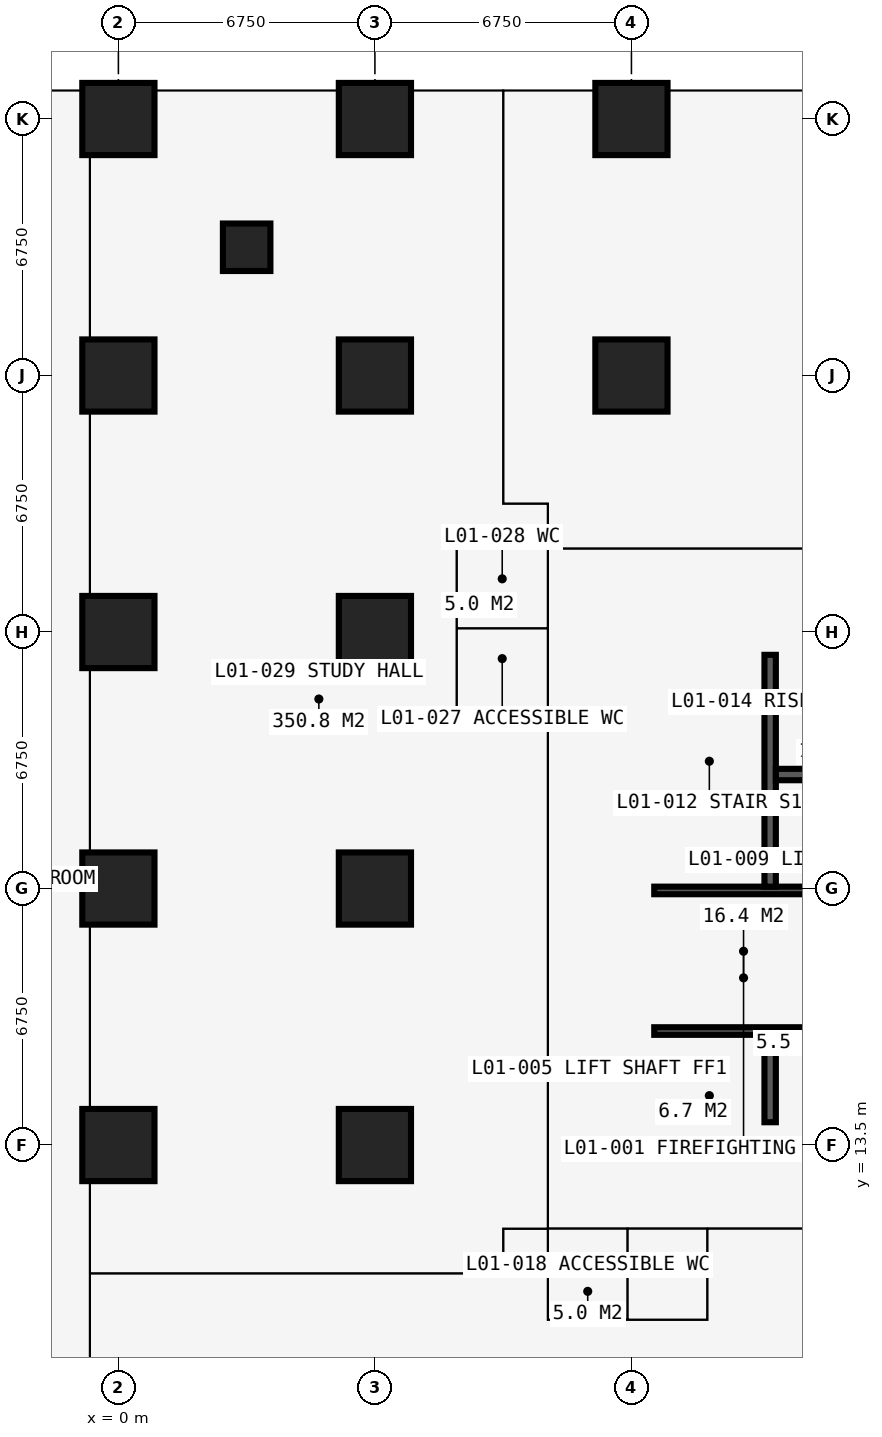
"""IFC4 building model, lengths in metres.
Left out: names, types, materials, properties, quantities, classifications, styles, units other than length and angle.
Written with IfcOpenShell. Run it as: python <this file> out.ifc"""

import sys

from ifc_helpers import new_model, si_unit, direction, frame, frame_2d, origin, origin_2d, place, context, subcontext, project, spatial, rectangle, extrude, element, fill, save


model = new_model("IFC4")
c1 = context("Model", 3, precision=1e-05, world=origin(), true_north=direction((0.0, 1.0)))
c2 = subcontext(c1, "Body", "Model", "MODEL_VIEW")
j1 = project(units=[si_unit("LENGTHUNIT", "METRE"), si_unit("PLANEANGLEUNIT", "RADIAN")], contexts=[c1])
p1 = place(None, origin())
s1 = spatial("IfcSite", under=j1, at=p1, CompositionType="ELEMENT")
p2 = place(p1, origin())
s2 = spatial("IfcBuilding", under=s1, at=p2, CompositionType="ELEMENT")
p3 = place(p2, frame((0.0, 0.0, 4.5)))
s3 = spatial("IfcBuildingStorey", under=s2, at=p3, CompositionType="ELEMENT", Elevation=4.5)
for number, where, z_axis, x_axis in (
    (1, (0.0, 13.5, 0.0), (0.0, 0.0, 1.0), (1.0, 0.0, 0.0)),
    (2, (0.0, 20.25, 0.0), (0.0, 0.0, 1.0), (1.0, 0.0, 0.0)),
    (3, (0.0, 27.0, 0.0), (0.0, 0.0, 1.0), (1.0, 0.0, 0.0)),
    (4, (0.0, 33.75, 0.0), (0.0, 0.0, 1.0), (1.0, 0.0, 0.0)),
    (5, (0.0, 40.5, 0.0), (0.0, 0.0, 1.0), (1.0, 0.0, 0.0)),
):
    element("IfcColumn", number, at=place(p3, frame(where, z_axis=z_axis, x_axis=x_axis)), inside=s3, PredefinedType="COLUMN", context=c2, shape_type="SweptSolid", body=[
        extrude(rectangle(XDim=1.9, YDim=1.9, at=origin_2d()), origin(), (0.0, 0.0, 1.0), 4.5),
    ])
p4 = place(p3, frame((3.375, 37.125, 0.0), z_axis=(0.0, 0.0, 1.0), x_axis=(1.0, 0.0, 0.0)))
e6 = element("IfcColumn", 6, at=p4, inside=s3, PredefinedType="COLUMN", context=c2, shape_type="SweptSolid", body=[
    extrude(rectangle(XDim=1.25, YDim=1.25, at=origin_2d()), origin(), (0.0, 0.0, 1.0), 4.5),
])
for number, where, z_axis, x_axis in (
    (7, (6.75, 13.5, 0.0), (0.0, 0.0, 1.0), (1.0, 0.0, 0.0)),
    (8, (6.75, 20.25, 0.0), (0.0, 0.0, 1.0), (1.0, 0.0, 0.0)),
    (9, (6.75, 27.0, 0.0), (0.0, 0.0, 1.0), (1.0, 0.0, 0.0)),
    (10, (6.75, 33.75, 0.0), (0.0, 0.0, 1.0), (1.0, 0.0, 0.0)),
    (11, (6.75, 40.5, 0.0), (0.0, 0.0, 1.0), (1.0, 0.0, 0.0)),
    (12, (13.5, 33.75, 0.0), (0.0, 0.0, 1.0), (1.0, 0.0, 0.0)),
    (13, (13.5, 40.5, 0.0), (0.0, 0.0, 1.0), (1.0, 0.0, 0.0)),
):
    element("IfcColumn", number, at=place(p3, frame(where, z_axis=z_axis, x_axis=x_axis)), inside=s3, PredefinedType="COLUMN", context=c2, shape_type="SweptSolid", body=[
        extrude(rectangle(XDim=1.9, YDim=1.9, at=origin_2d()), origin(), (0.0, 0.0, 1.0), 4.5),
    ])
p5 = place(p3, frame((12.9, 13.5, 0.0), z_axis=(0.0, 0.0, 1.0), x_axis=(1.0, 0.0, 0.0)))
e14 = element("IfcWall", 14, at=p5, inside=s3, PredefinedType="SHEAR", context=c2, shape_type="SweptSolid", body=[
    extrude(rectangle(XDim=14.7, YDim=1.2, at=frame_2d((7.35, 0.0))), origin(), (0.0, 0.0, 1.0), 4.5),
])
p6 = place(p3, frame((27.6, 27.0, 0.0), z_axis=(0.0, 0.0, 1.0), x_axis=(-1.0, 0.0, 0.0)))
e15 = element("IfcWall", 15, at=p6, inside=s3, PredefinedType="SHEAR", context=c2, shape_type="SweptSolid", body=[
    extrude(rectangle(XDim=14.7, YDim=1.2, at=frame_2d((7.35, 0.0))), origin(), (0.0, 0.0, 1.0), 4.5),
])
p7 = place(p6, frame((4.55, 0.0, 0.0)))
e16 = element("IfcOpeningElement", 16, at=p7, cuts=e15, PredefinedType="OPENING", context=c2, shape_type="SweptSolid", body=[
    extrude(rectangle(XDim=0.9, YDim=2.2, at=frame_2d((0.45, 1.1))), frame((0.0, 0.61, 0.0), z_axis=(0.0, -1.0, 0.0), x_axis=(1.0, 0.0, 0.0)), (0.0, 0.0, 1.0), 1.22),
])
p8 = place(p6, frame((7.525, 0.0, 0.0)))
e17 = element("IfcOpeningElement", 17, at=p8, cuts=e15, PredefinedType="OPENING", context=c2, shape_type="SweptSolid", body=[
    extrude(rectangle(XDim=1.0, YDim=2.2, at=frame_2d((0.5, 1.1))), frame((0.0, 0.61, 0.0), z_axis=(0.0, -1.0, 0.0), x_axis=(1.0, 0.0, 0.0)), (0.0, 0.0, 1.0), 1.22),
])
p9 = place(p3, frame((13.5, 26.4, 0.0), z_axis=(0.0, 0.0, 1.0), x_axis=(0.0, -1.0, 0.0)))
e18 = element("IfcWall", 18, at=p9, inside=s3, PredefinedType="SHEAR", context=c2, shape_type="SweptSolid", body=[
    extrude(rectangle(XDim=12.3, YDim=1.2, at=frame_2d((6.15, 0.0))), origin(), (0.0, 0.0, 1.0), 4.5),
])
p10 = place(p9, frame((7.45, 0.0, 0.0)))
e19 = element("IfcOpeningElement", 19, at=p10, cuts=e18, PredefinedType="OPENING", context=c2, shape_type="SweptSolid", body=[
    extrude(rectangle(XDim=1.2, YDim=2.2, at=frame_2d((0.6, 1.1))), frame((0.0, 0.61, 0.0), z_axis=(0.0, -1.0, 0.0), x_axis=(1.0, 0.0, 0.0)), (0.0, 0.0, 1.0), 1.22),
])
p11 = place(p3, frame((14.1, 16.5, 0.0), z_axis=(0.0, 0.0, 1.0), x_axis=(1.0, 0.0, 0.0)))
e20 = element("IfcWall", 20, at=p11, inside=s3, PredefinedType="SHEAR", context=c2, shape_type="SweptSolid", body=[
    extrude(rectangle(XDim=12.3, YDim=0.2, at=frame_2d((6.15, 0.0))), origin(), (0.0, 0.0, 1.0), 4.5),
])
p12 = place(p11, frame((0.9, 0.0, 0.0)))
e21 = element("IfcOpeningElement", 21, at=p12, cuts=e20, PredefinedType="OPENING", context=c2, shape_type="SweptSolid", body=[
    extrude(rectangle(XDim=1.1, YDim=2.2, at=frame_2d((0.55, 1.1))), frame((0.0, 0.11, 0.0), z_axis=(0.0, -1.0, 0.0), x_axis=(1.0, 0.0, 0.0)), (0.0, 0.0, 1.0), 0.22),
])
p13 = place(p11, frame((9.5, 0.0, 0.0)))
e22 = element("IfcOpeningElement", 22, at=p13, cuts=e20, PredefinedType="OPENING", context=c2, shape_type="SweptSolid", body=[
    extrude(rectangle(XDim=1.1, YDim=2.2, at=frame_2d((0.55, 1.1))), frame((0.0, 0.11, 0.0), z_axis=(0.0, -1.0, 0.0), x_axis=(1.0, 0.0, 0.0)), (0.0, 0.0, 1.0), 0.22),
])
p14 = place(p3, frame((14.1, 20.2, 0.0), z_axis=(0.0, 0.0, 1.0), x_axis=(1.0, 0.0, 0.0)))
e23 = element("IfcWall", 23, at=p14, inside=s3, PredefinedType="SHEAR", context=c2, shape_type="SweptSolid", body=[
    extrude(rectangle(XDim=12.3, YDim=0.2, at=frame_2d((6.15, 0.0))), origin(), (0.0, 0.0, 1.0), 4.5),
])
p15 = place(p14, frame((0.35, 0.0, 0.0)))
e24 = element("IfcOpeningElement", 24, at=p15, cuts=e23, PredefinedType="OPENING", context=c2, shape_type="SweptSolid", body=[
    extrude(rectangle(XDim=1.1, YDim=2.2, at=frame_2d((0.55, 1.1))), frame((0.0, 0.11, 0.0), z_axis=(0.0, -1.0, 0.0), x_axis=(1.0, 0.0, 0.0)), (0.0, 0.0, 1.0), 0.22),
])
p16 = place(p14, frame((9.75, 0.0, 0.0)))
e25 = element("IfcOpeningElement", 25, at=p16, cuts=e23, PredefinedType="OPENING", context=c2, shape_type="SweptSolid", body=[
    extrude(rectangle(XDim=1.1, YDim=2.2, at=frame_2d((0.55, 1.1))), frame((0.0, 0.11, 0.0), z_axis=(0.0, -1.0, 0.0), x_axis=(1.0, 0.0, 0.0)), (0.0, 0.0, 1.0), 0.22),
])
p17 = place(p3, frame((17.15, 20.3, 0.0), z_axis=(0.0, 0.0, 1.0), x_axis=(0.0, 1.0, 0.0)))
e26 = element("IfcWall", 26, at=p17, inside=s3, PredefinedType="SHEAR", context=c2, shape_type="SweptSolid", body=[
    extrude(rectangle(XDim=6.1, YDim=0.3, at=frame_2d((3.05, 0.0))), origin(), (0.0, 0.0, 1.0), 4.5),
])
p18 = place(p3, frame((17.3, 23.25, 0.0), z_axis=(0.0, 0.0, 1.0), x_axis=(1.0, 0.0, 0.0)))
e27 = element("IfcWall", 27, at=p18, inside=s3, PredefinedType="SHEAR", context=c2, shape_type="SweptSolid", body=[
    extrude(rectangle(XDim=5.9, YDim=0.3, at=frame_2d((2.95, 0.0))), origin(), (0.0, 0.0, 1.0), 4.5),
])
p19 = place(p3, frame((17.15, 14.1, 0.0), z_axis=(0.0, 0.0, 1.0), x_axis=(0.0, 1.0, 0.0)))
e28 = element("IfcWall", 28, at=p19, inside=s3, PredefinedType="SHEAR", context=c2, shape_type="SweptSolid", body=[
    extrude(rectangle(XDim=2.3, YDim=0.3, at=frame_2d((1.15, 0.0))), origin(), (0.0, 0.0, 1.0), 4.5),
])
p20 = place(p3, frame((-0.75, -0.75, 0.0), z_axis=(0.0, 0.0, 1.0), x_axis=(0.0, 1.0, 0.0)))
e29 = element("IfcWall", 29, at=p20, inside=s3, PredefinedType="PARTITIONING", context=c2, shape_type="SweptSolid", body=[
    extrude(rectangle(XDim=41.984, YDim=0.15, at=frame_2d((20.992, 0.0))), origin(), (0.0, 0.0, 1.0), 4.25),
])
p21 = place(p20, frame((4.65, 0.0, 0.0)))
e30 = element("IfcOpeningElement", 30, at=p21, cuts=e29, PredefinedType="OPENING", context=c2, shape_type="SweptSolid", body=[
    extrude(rectangle(XDim=1.6, YDim=2.4, at=frame_2d((0.8, 1.2))), frame((0.0, 0.085, 0.0), z_axis=(0.0, -1.0, 0.0), x_axis=(1.0, 0.0, 0.0)), (0.0, 0.0, 1.0), 0.17),
])
p22 = place(p3, frame((-0.75, 10.125, 0.0), z_axis=(0.0, 0.0, 1.0), x_axis=(1.0, 0.0, 0.0)))
e31 = element("IfcWall", 31, at=p22, inside=s3, PredefinedType="PARTITIONING", context=c2, shape_type="SweptSolid", body=[
    extrude(rectangle(XDim=10.875, YDim=0.15, at=frame_2d((5.438, 0.0))), origin(), (0.0, 0.0, 1.0), 4.25),
])
p23 = place(p3, frame((8.9, 25.0, 0.0), z_axis=(0.0, 0.0, 1.0), x_axis=(0.0, 1.0, 0.0)))
e32 = element("IfcWall", 32, at=p23, inside=s3, PredefinedType="PARTITIONING", context=c2, shape_type="SweptSolid", body=[
    extrude(rectangle(XDim=4.2, YDim=0.15, at=frame_2d((2.1, 0.0))), origin(), (0.0, 0.0, 1.0), 4.25),
])
p24 = place(p3, frame((8.9, 25.0, 0.0), z_axis=(0.0, 0.0, 1.0), x_axis=(1.0, 0.0, 0.0)))
e33 = element("IfcWall", 33, at=p24, inside=s3, PredefinedType="PARTITIONING", context=c2, shape_type="SweptSolid", body=[
    extrude(rectangle(XDim=2.4, YDim=0.1, at=frame_2d((1.2, 0.0))), origin(), (0.0, 0.0, 1.0), 4.25),
])
p25 = place(p3, frame((8.9, 27.1, 0.0), z_axis=(0.0, 0.0, 1.0), x_axis=(1.0, 0.0, 0.0)))
e34 = element("IfcWall", 34, at=p25, inside=s3, PredefinedType="PARTITIONING", context=c2, shape_type="SweptSolid", body=[
    extrude(rectangle(XDim=2.4, YDim=0.1, at=frame_2d((1.2, 0.0))), origin(), (0.0, 0.0, 1.0), 3.752),
])
p26 = place(p3, frame((8.9, 29.2, 0.0), z_axis=(0.0, 0.0, 1.0), x_axis=(1.0, 0.0, 0.0)))
e35 = element("IfcWall", 35, at=p26, inside=s3, PredefinedType="PARTITIONING", context=c2, shape_type="SweptSolid", body=[
    extrude(rectangle(XDim=21.475, YDim=0.15, at=frame_2d((10.738, 0.0))), origin(), (0.0, 0.0, 1.0), 4.25),
])
p27 = place(p26, frame((16.65, 0.0, 0.0)))
e36 = element("IfcOpeningElement", 36, at=p27, cuts=e35, PredefinedType="OPENING", context=c2, shape_type="SweptSolid", body=[
    extrude(rectangle(XDim=1.0, YDim=2.2, at=frame_2d((0.5, 1.1))), frame((0.0, 0.085, 0.0), z_axis=(0.0, -1.0, 0.0), x_axis=(1.0, 0.0, 0.0)), (0.0, 0.0, 1.0), 0.17),
])
p28 = place(p26, frame((18.75, 0.0, 0.0)))
e37 = element("IfcOpeningElement", 37, at=p28, cuts=e35, PredefinedType="OPENING", context=c2, shape_type="SweptSolid", body=[
    extrude(rectangle(XDim=1.0, YDim=2.2, at=frame_2d((0.5, 1.1))), frame((0.0, 0.085, 0.0), z_axis=(0.0, -1.0, 0.0), x_axis=(1.0, 0.0, 0.0)), (0.0, 0.0, 1.0), 0.17),
])
p29 = place(p26, frame((8.45, 0.0, 0.0)))
e38 = element("IfcOpeningElement", 38, at=p29, cuts=e35, PredefinedType="OPENING", context=c2, shape_type="SweptSolid", body=[
    extrude(rectangle(XDim=1.6, YDim=2.4, at=frame_2d((0.8, 1.2))), frame((0.0, 0.085, 0.0), z_axis=(0.0, -1.0, 0.0), x_axis=(1.0, 0.0, 0.0)), (0.0, 0.0, 1.0), 0.17),
])
p30 = place(p3, frame((10.125, 10.125, 0.0), z_axis=(0.0, 0.0, 1.0), x_axis=(0.0, 1.0, 0.0)))
e39 = element("IfcWall", 39, at=p30, inside=s3, PredefinedType="PARTITIONING", context=c2, shape_type="SweptSolid", body=[
    extrude(rectangle(XDim=1.175, YDim=0.15, at=frame_2d((0.587, 0.0))), origin(), (0.0, 0.0, 1.0), 4.25),
])
p31 = place(p3, frame((10.125, 11.3, 0.0), z_axis=(0.0, 0.0, 1.0), x_axis=(1.0, 0.0, 0.0)))
e40 = element("IfcWall", 40, at=p31, inside=s3, PredefinedType="PARTITIONING", context=c2, shape_type="SweptSolid", body=[
    extrude(rectangle(XDim=20.675, YDim=0.15, at=frame_2d((10.337, 0.0))), origin(), (0.0, 0.0, 1.0), 4.25),
])
p32 = place(p31, frame((1.725, 0.0, 0.0)))
e41 = element("IfcOpeningElement", 41, at=p32, cuts=e40, PredefinedType="OPENING", context=c2, shape_type="SweptSolid", body=[
    extrude(rectangle(XDim=1.0, YDim=2.2, at=frame_2d((0.5, 1.1))), frame((0.0, 0.085, 0.0), z_axis=(0.0, -1.0, 0.0), x_axis=(1.0, 0.0, 0.0)), (0.0, 0.0, 1.0), 0.17),
])
p33 = place(p31, frame((3.825, 0.0, 0.0)))
e42 = element("IfcOpeningElement", 42, at=p33, cuts=e40, PredefinedType="OPENING", context=c2, shape_type="SweptSolid", body=[
    extrude(rectangle(XDim=1.0, YDim=2.2, at=frame_2d((0.5, 1.1))), frame((0.0, 0.085, 0.0), z_axis=(0.0, -1.0, 0.0), x_axis=(1.0, 0.0, 0.0)), (0.0, 0.0, 1.0), 0.17),
])
p34 = place(p31, frame((10.625, 0.0, 0.0)))
e43 = element("IfcOpeningElement", 43, at=p34, cuts=e40, PredefinedType="OPENING", context=c2, shape_type="SweptSolid", body=[
    extrude(rectangle(XDim=1.6, YDim=2.4, at=frame_2d((0.8, 1.2))), frame((0.0, 0.085, 0.0), z_axis=(0.0, -1.0, 0.0), x_axis=(1.0, 0.0, 0.0)), (0.0, 0.0, 1.0), 0.17),
])
p35 = place(p3, frame((10.125, 30.375, 0.0), z_axis=(0.0, 0.0, 1.0), x_axis=(0.0, 1.0, 0.0)))
e44 = element("IfcWall", 44, at=p35, inside=s3, PredefinedType="PARTITIONING", context=c2, shape_type="SweptSolid", body=[
    extrude(rectangle(XDim=10.859, YDim=0.15, at=frame_2d((5.429, 0.0))), origin(), (0.0, 0.0, 1.0), 4.25),
])
p36 = place(p3, frame((10.125, 30.375, 0.0), z_axis=(0.0, 0.0, 1.0), x_axis=(1.0, 0.0, 0.0)))
e45 = element("IfcWall", 45, at=p36, inside=s3, PredefinedType="PARTITIONING", context=c2, shape_type="SweptSolid", body=[
    extrude(rectangle(XDim=1.175, YDim=0.15, at=frame_2d((0.587, 0.0))), origin(), (0.0, 0.0, 1.0), 4.25),
])
p37 = place(p3, frame((11.3, 8.9, 0.0), z_axis=(0.0, 0.0, 1.0), x_axis=(0.0, 1.0, 0.0)))
e46 = element("IfcWall", 46, at=p37, inside=s3, PredefinedType="PARTITIONING", context=c2, shape_type="SweptSolid", body=[
    extrude(rectangle(XDim=21.475, YDim=0.15, at=frame_2d((10.738, 0.0))), origin(), (0.0, 0.0, 1.0), 4.25),
])
p38 = place(p37, frame((16.65, 0.0, 0.0)))
e47 = element("IfcOpeningElement", 47, at=p38, cuts=e46, PredefinedType="OPENING", context=c2, shape_type="SweptSolid", body=[
    extrude(rectangle(XDim=1.0, YDim=2.2, at=frame_2d((0.5, 1.1))), frame((0.0, 0.085, 0.0), z_axis=(0.0, -1.0, 0.0), x_axis=(1.0, 0.0, 0.0)), (0.0, 0.0, 1.0), 0.17),
])
p39 = place(p37, frame((18.75, 0.0, 0.0)))
e48 = element("IfcOpeningElement", 48, at=p39, cuts=e46, PredefinedType="OPENING", context=c2, shape_type="SweptSolid", body=[
    extrude(rectangle(XDim=1.0, YDim=2.2, at=frame_2d((0.5, 1.1))), frame((0.0, 0.085, 0.0), z_axis=(0.0, -1.0, 0.0), x_axis=(1.0, 0.0, 0.0)), (0.0, 0.0, 1.0), 0.17),
])
p40 = place(p37, frame((8.45, 0.0, 0.0)))
e49 = element("IfcOpeningElement", 49, at=p40, cuts=e46, PredefinedType="OPENING", context=c2, shape_type="SweptSolid", body=[
    extrude(rectangle(XDim=1.6, YDim=2.4, at=frame_2d((0.8, 1.2))), frame((0.0, 0.085, 0.0), z_axis=(0.0, -1.0, 0.0), x_axis=(1.0, 0.0, 0.0)), (0.0, 0.0, 1.0), 0.17),
])
p41 = place(p3, frame((11.3, 8.9, 0.0), z_axis=(0.0, 0.0, 1.0), x_axis=(1.0, 0.0, 0.0)))
e50 = element("IfcWall", 50, at=p41, inside=s3, PredefinedType="PARTITIONING", context=c2, shape_type="SweptSolid", body=[
    extrude(rectangle(XDim=4.2, YDim=0.15, at=frame_2d((2.1, 0.0))), origin(), (0.0, 0.0, 1.0), 4.25),
])
p42 = place(p3, frame((13.4, 8.9, 0.0), z_axis=(0.0, 0.0, 1.0), x_axis=(0.0, 1.0, 0.0)))
e51 = element("IfcWall", 51, at=p42, inside=s3, PredefinedType="PARTITIONING", context=c2, shape_type="SweptSolid", body=[
    extrude(rectangle(XDim=2.4, YDim=0.1, at=frame_2d((1.2, 0.0))), origin(), (0.0, 0.0, 1.0), 3.752),
])
p43 = place(p3, frame((15.5, 8.9, 0.0), z_axis=(0.0, 0.0, 1.0), x_axis=(0.0, 1.0, 0.0)))
e52 = element("IfcWall", 52, at=p43, inside=s3, PredefinedType="PARTITIONING", context=c2, shape_type="SweptSolid", body=[
    extrude(rectangle(XDim=2.4, YDim=0.1, at=frame_2d((1.2, 0.0))), origin(), (0.0, 0.0, 1.0), 4.25),
])
p44 = place(p12, origin())
e53 = element("IfcDoor", 53, at=p44, inside=s3, OperationType="DOUBLE_DOOR_SLIDING", PredefinedType="DOOR", context=c2, shape_type="SweptSolid", body=[
    extrude(rectangle(XDim=1.1, YDim=2.2, at=frame_2d((0.55, 1.1))), frame((0.0, 0.025, 0.0), z_axis=(0.0, -1.0, 0.0), x_axis=(1.0, 0.0, 0.0)), (0.0, 0.0, 1.0), 0.05),
])
fill(e21, e53)
p45 = place(p10, origin())
e54 = element("IfcDoor", 54, at=p45, inside=s3, OperationType="DOUBLE_DOOR_SINGLE_SWING", PredefinedType="DOOR", context=c2, shape_type="SweptSolid", body=[
    extrude(rectangle(XDim=1.2, YDim=2.2, at=frame_2d((0.6, 1.1))), frame((0.0, 0.025, 0.0), z_axis=(0.0, -1.0, 0.0), x_axis=(1.0, 0.0, 0.0)), (0.0, 0.0, 1.0), 0.05),
])
fill(e19, e54)
p46 = place(p15, origin())
e55 = element("IfcDoor", 55, at=p46, inside=s3, OperationType="SINGLE_SWING_LEFT", PredefinedType="DOOR", context=c2, shape_type="SweptSolid", body=[
    extrude(rectangle(XDim=1.1, YDim=2.2, at=frame_2d((0.55, 1.1))), frame((0.0, 0.025, 0.0), z_axis=(0.0, -1.0, 0.0), x_axis=(1.0, 0.0, 0.0)), (0.0, 0.0, 1.0), 0.05),
])
fill(e24, e55)
p47 = place(p32, origin())
e56 = element("IfcDoor", 56, at=p47, inside=s3, OperationType="SINGLE_SWING_LEFT", PredefinedType="DOOR", context=c2, shape_type="SweptSolid", body=[
    extrude(rectangle(XDim=1.0, YDim=2.2, at=frame_2d((0.5, 1.1))), frame((0.0, 0.025, 0.0), z_axis=(0.0, -1.0, 0.0), x_axis=(1.0, 0.0, 0.0)), (0.0, 0.0, 1.0), 0.05),
])
fill(e41, e56)
p48 = place(p33, origin())
e57 = element("IfcDoor", 57, at=p48, inside=s3, OperationType="SINGLE_SWING_LEFT", PredefinedType="DOOR", context=c2, shape_type="SweptSolid", body=[
    extrude(rectangle(XDim=1.0, YDim=2.2, at=frame_2d((0.5, 1.1))), frame((0.0, 0.025, 0.0), z_axis=(0.0, -1.0, 0.0), x_axis=(1.0, 0.0, 0.0)), (0.0, 0.0, 1.0), 0.05),
])
fill(e42, e57)
p49 = place(p29, origin())
e58 = element("IfcDoor", 58, at=p49, inside=s3, OperationType="DOUBLE_DOOR_SINGLE_SWING", PredefinedType="DOOR", context=c2, shape_type="SweptSolid", body=[
    extrude(rectangle(XDim=1.6, YDim=2.4, at=frame_2d((0.8, 1.2))), frame((0.0, 0.025, 0.0), z_axis=(0.0, -1.0, 0.0), x_axis=(1.0, 0.0, 0.0)), (0.0, 0.0, 1.0), 0.05),
])
fill(e38, e58)
p50 = place(p38, origin())
e59 = element("IfcDoor", 59, at=p50, inside=s3, OperationType="SINGLE_SWING_LEFT", PredefinedType="DOOR", context=c2, shape_type="SweptSolid", body=[
    extrude(rectangle(XDim=1.0, YDim=2.2, at=frame_2d((0.5, 1.1))), frame((0.0, 0.025, 0.0), z_axis=(0.0, -1.0, 0.0), x_axis=(1.0, 0.0, 0.0)), (0.0, 0.0, 1.0), 0.05),
])
fill(e47, e59)
p51 = place(p39, origin())
e60 = element("IfcDoor", 60, at=p51, inside=s3, OperationType="SINGLE_SWING_LEFT", PredefinedType="DOOR", context=c2, shape_type="SweptSolid", body=[
    extrude(rectangle(XDim=1.0, YDim=2.2, at=frame_2d((0.5, 1.1))), frame((0.0, 0.025, 0.0), z_axis=(0.0, -1.0, 0.0), x_axis=(1.0, 0.0, 0.0)), (0.0, 0.0, 1.0), 0.05),
])
fill(e48, e60)
p52 = place(p40, origin())
e61 = element("IfcDoor", 61, at=p52, inside=s3, OperationType="DOUBLE_DOOR_SINGLE_SWING", PredefinedType="DOOR", context=c2, shape_type="SweptSolid", body=[
    extrude(rectangle(XDim=1.6, YDim=2.4, at=frame_2d((0.8, 1.2))), frame((0.0, 0.025, 0.0), z_axis=(0.0, -1.0, 0.0), x_axis=(1.0, 0.0, 0.0)), (0.0, 0.0, 1.0), 0.05),
])
fill(e49, e61)
save(model, sys.argv[1])
